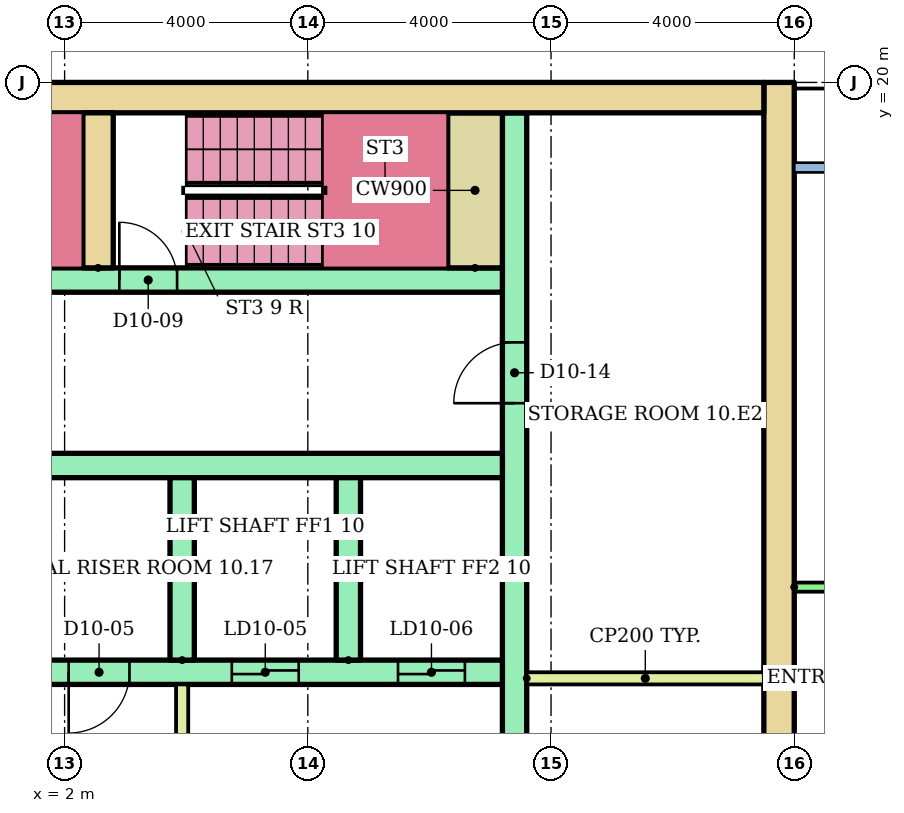
"""IFC4 building model, lengths in metres.
Left out: names, types, materials, properties, quantities, classifications, styles, units other than length and angle.
Written with IfcOpenShell. Run it as: python <this file> out.ifc"""

import sys

from ifc_helpers import new_model, si_unit, direction, frame, frame_2d, origin, place, context, subcontext, project, spatial, rectangle, extrude, element, fill, save


model = new_model("IFC4")
c1 = context("Model", 3, precision=1e-05, world=origin(), true_north=direction((0.0, 1.0)))
c2 = subcontext(c1, "Body", "Model", "MODEL_VIEW")
j1 = project(units=[si_unit("LENGTHUNIT", "METRE"), si_unit("PLANEANGLEUNIT", "RADIAN")], contexts=[c1])
p1 = place(None, origin())
s1 = spatial("IfcSite", under=j1, at=p1, CompositionType="ELEMENT")
p2 = place(p1, origin())
s2 = spatial("IfcBuilding", under=s1, at=p2, CompositionType="ELEMENT")
p3 = place(p2, frame((0.0, 0.0, 41.6)))
s3 = spatial("IfcBuildingStorey", under=s2, at=p3, CompositionType="ELEMENT", Elevation=41.6)
p4 = place(p3, frame((13.75, 3.0, 0.0), z_axis=(0.0, 0.0, 1.0), x_axis=(0.0, 1.0, 0.0)))
e1 = element("IfcWall", 1, at=p4, inside=s3, PredefinedType="SHEAR", context=c2, shape_type="SweptSolid", body=[
    extrude(rectangle(XDim=17.0, YDim=0.5, at=frame_2d((8.5, 0.0))), origin(), (0.0, 0.0, 1.0), 2.92),
])
p5 = place(p3, frame((-13.5, 19.75, 0.0)))
e2 = element("IfcWall", 2, at=p5, inside=s3, PredefinedType="SHEAR", context=c2, shape_type="SweptSolid", body=[
    extrude(rectangle(XDim=27.0, YDim=0.5, at=frame_2d((13.5, 0.0))), origin(), (0.0, 0.0, 1.0), 2.92),
])
p6 = place(p3, frame((9.4, 6.8, 0.0), z_axis=(0.0, 0.0, 1.0), x_axis=(0.0, 1.0, 0.0)))
e3 = element("IfcWall", 3, at=p6, inside=s3, PredefinedType="SHEAR", context=c2, shape_type="SweptSolid", body=[
    extrude(rectangle(XDim=12.7, YDim=0.4, at=frame_2d((6.35, 0.0))), origin(), (0.0, 0.0, 1.0), 2.92),
])
p7 = place(p6, frame((1.15, 0.0, 0.0)))
e4 = element("IfcOpeningElement", 4, at=p7, cuts=e3, PredefinedType="OPENING", context=c2, shape_type="SweptSolid", body=[
    extrude(rectangle(XDim=1.0, YDim=2.1, at=frame_2d((0.5, 1.05))), frame((0.0, 0.21, 0.0), z_axis=(0.0, -1.0, 0.0), x_axis=(1.0, 0.0, 0.0)), (0.0, 0.0, 1.0), 0.42),
])
p8 = place(p6, frame((7.925, 0.0, 0.0)))
e5 = element("IfcOpeningElement", 5, at=p8, cuts=e3, PredefinedType="OPENING", context=c2, shape_type="SweptSolid", body=[
    extrude(rectangle(XDim=1.0, YDim=2.1, at=frame_2d((0.5, 1.05))), frame((0.0, 0.21, 0.0), z_axis=(0.0, -1.0, 0.0), x_axis=(1.0, 0.0, 0.0)), (0.0, 0.0, 1.0), 0.42),
])
p9 = place(p3, frame((1.2, 10.3, 0.0)))
e6 = element("IfcWall", 6, at=p9, inside=s3, PredefinedType="SHEAR", context=c2, shape_type="SweptSolid", body=[
    extrude(rectangle(XDim=8.0, YDim=0.4, at=frame_2d((4.0, 0.0))), origin(), (0.0, 0.0, 1.0), 2.92),
])
p10 = place(p9, frame((3.55, 0.0, 0.0)))
e7 = element("IfcOpeningElement", 7, at=p10, cuts=e6, PredefinedType="OPENING", context=c2, shape_type="SweptSolid", body=[
    extrude(rectangle(XDim=1.1, YDim=2.1, at=frame_2d((0.55, 1.05))), frame((0.0, 0.21, 0.0), z_axis=(0.0, -1.0, 0.0), x_axis=(1.0, 0.0, 0.0)), (0.0, 0.0, 1.0), 0.42),
])
p11 = place(p9, frame((6.283, 0.0, 0.0)))
e8 = element("IfcOpeningElement", 8, at=p11, cuts=e6, PredefinedType="OPENING", context=c2, shape_type="SweptSolid", body=[
    extrude(rectangle(XDim=1.1, YDim=2.1, at=frame_2d((0.55, 1.05))), frame((0.0, 0.21, 0.0), z_axis=(0.0, -1.0, 0.0), x_axis=(1.0, 0.0, 0.0)), (0.0, 0.0, 1.0), 0.42),
])
p12 = place(p9, frame((0.867, 0.0, 0.0)))
e9 = element("IfcOpeningElement", 9, at=p12, cuts=e6, PredefinedType="OPENING", context=c2, shape_type="SweptSolid", body=[
    extrude(rectangle(XDim=1.0, YDim=2.1, at=frame_2d((0.5, 1.05))), frame((0.0, 0.21, 0.0), z_axis=(0.0, -1.0, 0.0), x_axis=(1.0, 0.0, 0.0)), (0.0, 0.0, 1.0), 0.42),
])
p13 = place(p3, frame((1.2, 13.7, 0.0)))
e10 = element("IfcWall", 10, at=p13, inside=s3, PredefinedType="SHEAR", context=c2, shape_type="SweptSolid", body=[
    extrude(rectangle(XDim=8.0, YDim=0.4, at=frame_2d((4.0, 0.0))), origin(), (0.0, 0.0, 1.0), 2.92),
])
for number, where, z_axis, x_axis in (
    (11, (3.933, 10.5, 0.0), (0.0, 0.0, 1.0), (0.0, 1.0, 0.0)),
    (12, (6.667, 10.5, 0.0), (0.0, 0.0, 1.0), (0.0, 1.0, 0.0)),
):
    element("IfcWall", number, at=place(p3, frame(where, z_axis=z_axis, x_axis=x_axis)), inside=s3, PredefinedType="SHEAR", context=c2, shape_type="SweptSolid", body=[
        extrude(rectangle(XDim=3.0, YDim=0.4, at=frame_2d((1.5, 0.0))), origin(), (0.0, 0.0, 1.0), 2.92),
    ])
p14 = place(p3, frame((3.933, 6.8, 0.0), z_axis=(0.0, 0.0, 1.0), x_axis=(0.0, 1.0, 0.0)))
e13 = element("IfcWall", 13, at=p14, inside=s3, PredefinedType="PARTITIONING", context=c2, shape_type="SweptSolid", body=[
    extrude(rectangle(XDim=3.3, YDim=0.2, at=frame_2d((1.65, 0.0))), origin(), (0.0, 0.0, 1.0), 2.92),
])
p15 = place(p14, frame((1.1, 0.0, 0.0)))
e14 = element("IfcOpeningElement", 14, at=p15, cuts=e13, PredefinedType="OPENING", context=c2, shape_type="SweptSolid", body=[
    extrude(rectangle(XDim=1.1, YDim=2.1, at=frame_2d((0.55, 1.05))), frame((0.0, 0.11, 0.0), z_axis=(0.0, -1.0, 0.0), x_axis=(1.0, 0.0, 0.0)), (0.0, 0.0, 1.0), 0.22),
])
p16 = place(p3, frame((-9.2, 16.75, 0.0)))
e15 = element("IfcWall", 15, at=p16, inside=s3, PredefinedType="SHEAR", context=c2, shape_type="SweptSolid", body=[
    extrude(rectangle(XDim=18.4, YDim=0.4, at=frame_2d((9.2, 0.0))), origin(), (0.0, 0.0, 1.0), 2.92),
])
p17 = place(p16, frame((0.1, 0.0, 0.0)))
e16 = element("IfcOpeningElement", 16, at=p17, cuts=e15, PredefinedType="OPENING", context=c2, shape_type="SweptSolid", body=[
    extrude(rectangle(XDim=0.95, YDim=2.1, at=frame_2d((0.475, 1.05))), frame((0.0, 0.21, 0.0), z_axis=(0.0, -1.0, 0.0), x_axis=(1.0, 0.0, 0.0)), (0.0, 0.0, 1.0), 0.42),
])
p18 = place(p16, frame((6.1, 0.0, 0.0)))
e17 = element("IfcOpeningElement", 17, at=p18, cuts=e15, PredefinedType="OPENING", context=c2, shape_type="SweptSolid", body=[
    extrude(rectangle(XDim=0.95, YDim=2.1, at=frame_2d((0.475, 1.05))), frame((0.0, 0.21, 0.0), z_axis=(0.0, -1.0, 0.0), x_axis=(1.0, 0.0, 0.0)), (0.0, 0.0, 1.0), 0.42),
])
p19 = place(p16, frame((12.1, 0.0, 0.0)))
e18 = element("IfcOpeningElement", 18, at=p19, cuts=e15, PredefinedType="OPENING", context=c2, shape_type="SweptSolid", body=[
    extrude(rectangle(XDim=0.95, YDim=2.1, at=frame_2d((0.475, 1.05))), frame((0.0, 0.21, 0.0), z_axis=(0.0, -1.0, 0.0), x_axis=(1.0, 0.0, 0.0)), (0.0, 0.0, 1.0), 0.42),
])
p20 = place(p3, frame((2.55, 16.95, 0.0), z_axis=(0.0, 0.0, 1.0), x_axis=(0.0, 1.0, 0.0)))
e19 = element("IfcWall", 19, at=p20, inside=s3, PredefinedType="SHEAR", context=c2, shape_type="SweptSolid", body=[
    extrude(rectangle(XDim=2.55, YDim=0.5, at=frame_2d((1.275, 0.0))), origin(), (0.0, 0.0, 1.0), 2.92),
])
p21 = place(p3, frame((8.75, 16.95, 0.0), z_axis=(0.0, 0.0, 1.0), x_axis=(0.0, 1.0, 0.0)))
e20 = element("IfcWall", 20, at=p21, inside=s3, PredefinedType="SHEAR", context=c2, shape_type="SweptSolid", body=[
    extrude(rectangle(XDim=2.55, YDim=0.9, at=frame_2d((1.275, 0.0))), origin(), (0.0, 0.0, 1.0), 2.92),
])
p22 = place(p3, frame((9.6, 10.2, 0.0)))
e21 = element("IfcWall", 21, at=p22, inside=s3, PredefinedType="PARTITIONING", context=c2, shape_type="SweptSolid", body=[
    extrude(rectangle(XDim=3.9, YDim=0.2, at=frame_2d((1.95, 0.0))), origin(), (0.0, 0.0, 1.0), 2.92),
])
p23 = place(p3, frame((14.0, 11.7, 0.0)))
e22 = element("IfcWall", 22, at=p23, inside=s3, PredefinedType="PARTITIONING", context=c2, shape_type="SweptSolid", body=[
    extrude(rectangle(XDim=12.0, YDim=0.15, at=frame_2d((6.0, 0.0))), origin(), (0.0, 0.0, 1.0), 2.4),
])
p24 = place(p23, frame((1.5, 0.0, 0.0)))
e23 = element("IfcOpeningElement", 23, at=p24, cuts=e22, PredefinedType="OPENING", context=c2, shape_type="SweptSolid", body=[
    extrude(rectangle(XDim=1.0, YDim=2.1, at=frame_2d((0.5, 1.05))), frame((0.0, 0.085, 0.0), z_axis=(0.0, -1.0, 0.0), x_axis=(1.0, 0.0, 0.0)), (0.0, 0.0, 1.0), 0.17),
])
p25 = place(p23, frame((7.5, 0.0, 0.0)))
e24 = element("IfcOpeningElement", 24, at=p25, cuts=e22, PredefinedType="OPENING", context=c2, shape_type="SweptSolid", body=[
    extrude(rectangle(XDim=1.0, YDim=2.1, at=frame_2d((0.5, 1.05))), frame((0.0, 0.085, 0.0), z_axis=(0.0, -1.0, 0.0), x_axis=(1.0, 0.0, 0.0)), (0.0, 0.0, 1.0), 0.17),
])
p26 = place(p10, origin())
e25 = element("IfcDoor", 25, at=p26, inside=s3, OperationType="SLIDING_TO_LEFT", PredefinedType="DOOR", context=c2, shape_type="SweptSolid", body=[
    extrude(rectangle(XDim=1.1, YDim=2.1, at=frame_2d((0.55, 1.05))), frame((0.0, 0.025, 0.0), z_axis=(0.0, -1.0, 0.0), x_axis=(1.0, 0.0, 0.0)), (0.0, 0.0, 1.0), 0.05),
])
fill(e7, e25)
p27 = place(p11, origin())
e26 = element("IfcDoor", 26, at=p27, inside=s3, OperationType="SLIDING_TO_LEFT", PredefinedType="DOOR", context=c2, shape_type="SweptSolid", body=[
    extrude(rectangle(XDim=1.1, YDim=2.1, at=frame_2d((0.55, 1.05))), frame((0.0, 0.025, 0.0), z_axis=(0.0, -1.0, 0.0), x_axis=(1.0, 0.0, 0.0)), (0.0, 0.0, 1.0), 0.05),
])
fill(e8, e26)
p28 = place(p12, frame((1.0, 0.0, 0.0), z_axis=(0.0, 0.0, 1.0), x_axis=(-1.0, 0.0, 0.0)))
e27 = element("IfcDoor", 27, at=p28, inside=s3, OperationType="SINGLE_SWING_LEFT", PredefinedType="DOOR", context=c2, shape_type="SweptSolid", body=[
    extrude(rectangle(XDim=1.0, YDim=2.1, at=frame_2d((0.5, 1.05))), frame((0.0, 0.025, 0.0), z_axis=(0.0, -1.0, 0.0), x_axis=(1.0, 0.0, 0.0)), (0.0, 0.0, 1.0), 0.05),
])
fill(e9, e27)
p29 = place(p19, origin())
e28 = element("IfcDoor", 28, at=p29, inside=s3, OperationType="SINGLE_SWING_LEFT", PredefinedType="DOOR", context=c2, shape_type="SweptSolid", body=[
    extrude(rectangle(XDim=0.95, YDim=2.1, at=frame_2d((0.475, 1.05))), frame((0.0, 0.025, 0.0), z_axis=(0.0, -1.0, 0.0), x_axis=(1.0, 0.0, 0.0)), (0.0, 0.0, 1.0), 0.05),
])
fill(e18, e28)
p30 = place(p8, origin())
e29 = element("IfcDoor", 29, at=p30, inside=s3, OperationType="SINGLE_SWING_LEFT", PredefinedType="DOOR", context=c2, shape_type="SweptSolid", body=[
    extrude(rectangle(XDim=1.0, YDim=2.1, at=frame_2d((0.5, 1.05))), frame((0.0, 0.025, 0.0), z_axis=(0.0, -1.0, 0.0), x_axis=(1.0, 0.0, 0.0)), (0.0, 0.0, 1.0), 0.05),
])
fill(e5, e29)
save(model, sys.argv[1])
